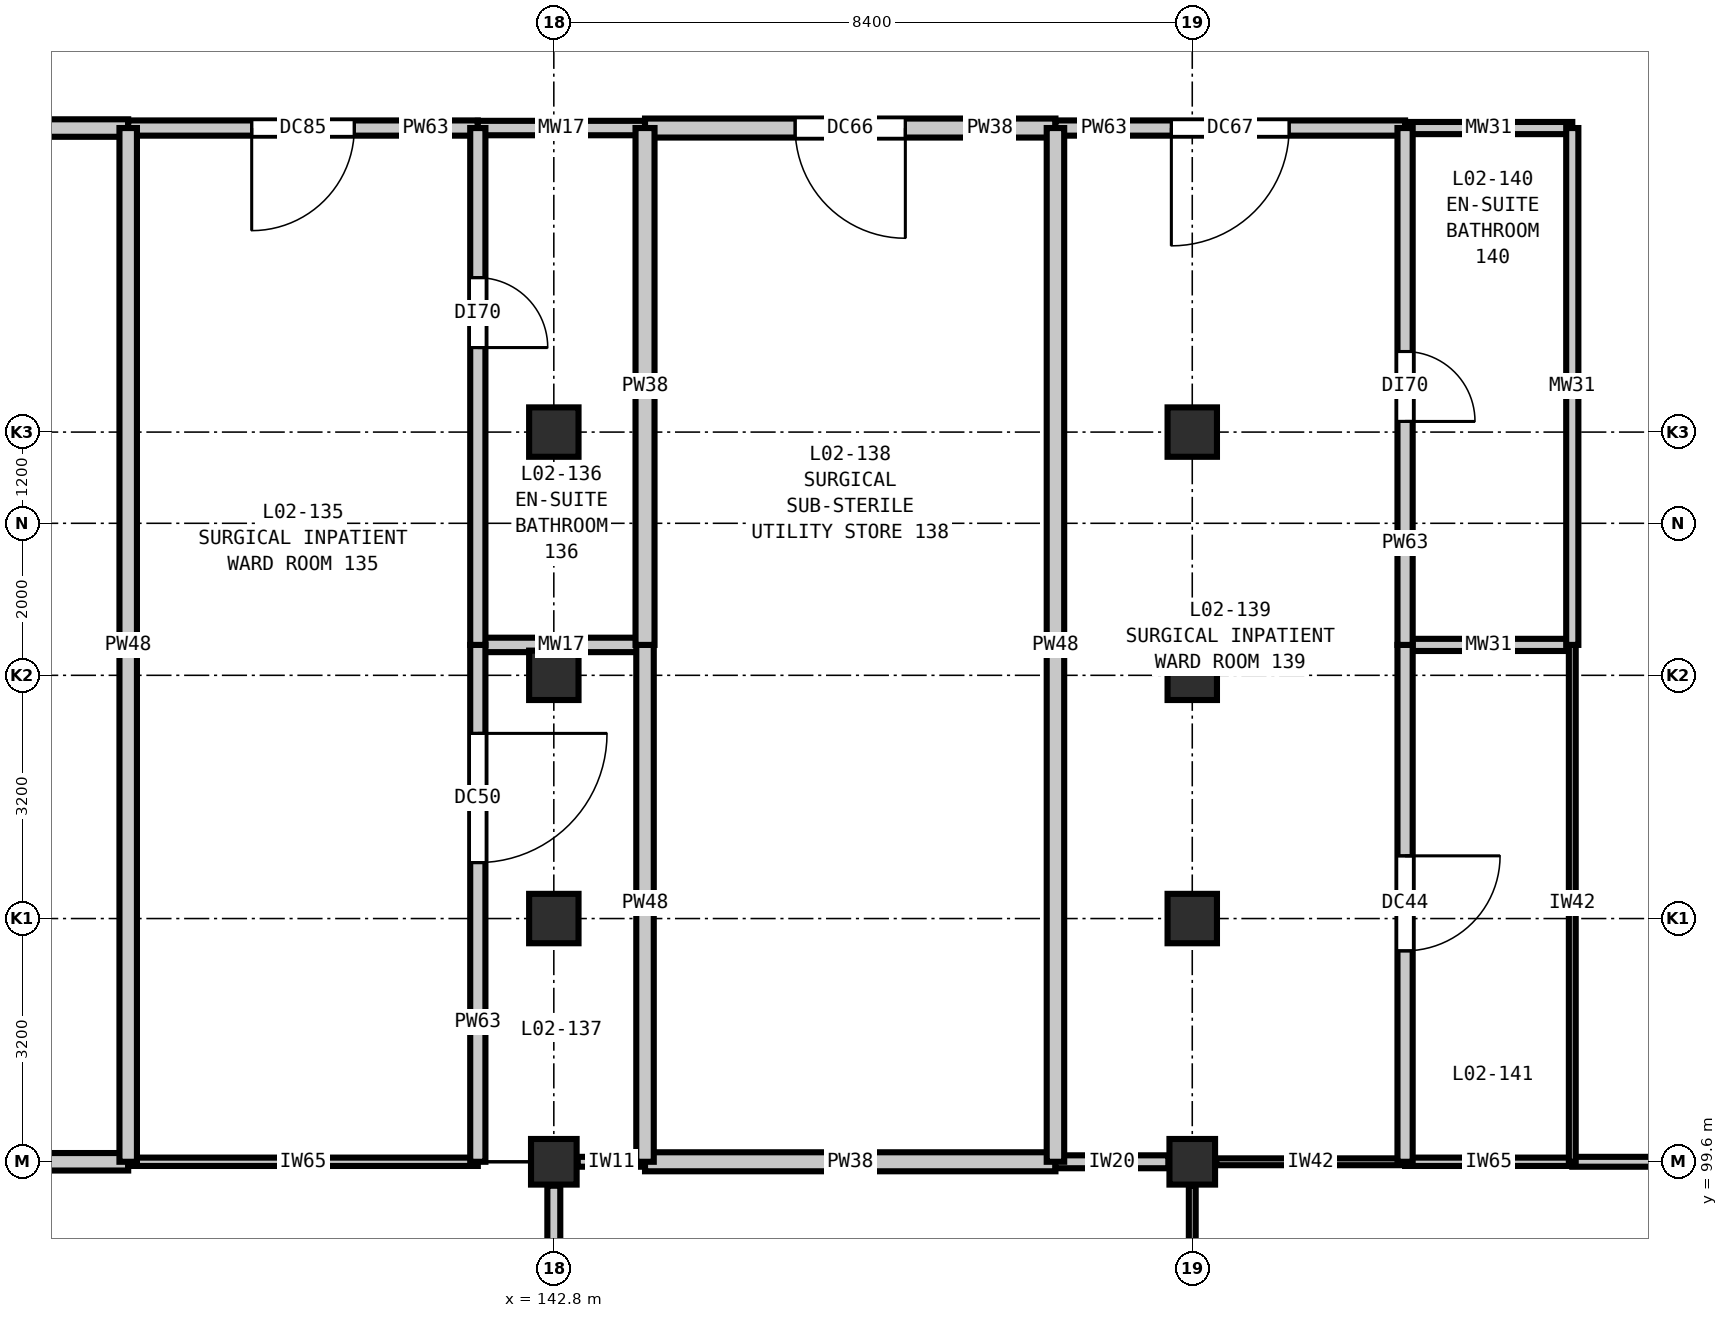
"""IFC4 building model, lengths in metres.
Left out: names, types, materials, properties, quantities, classifications, styles, units other than length and angle.
Written with IfcOpenShell. Run it as: python <this file> out.ifc"""

import sys

from ifc_helpers import new_model, si_unit, direction, frame, frame_2d, origin, origin_2d, place, context, subcontext, project, spatial, rectangle, extrude, element, fill, save


model = new_model("IFC4")
c1 = context("Model", 3, precision=1e-05, world=origin(), true_north=direction((0.0, 1.0)))
c2 = subcontext(c1, "Body", "Model", "MODEL_VIEW")
j1 = project(units=[si_unit("LENGTHUNIT", "METRE"), si_unit("PLANEANGLEUNIT", "RADIAN")], contexts=[c1])
p1 = place(None, origin())
s1 = spatial("IfcSite", under=j1, at=p1, CompositionType="ELEMENT")
p2 = place(p1, origin())
s2 = spatial("IfcBuilding", under=s1, at=p2, CompositionType="ELEMENT")
p3 = place(p2, frame((0.0, 0.0, 10.8)))
s3 = spatial("IfcBuildingStorey", under=s2, at=p3, CompositionType="ELEMENT", Elevation=10.8)
p4 = place(p3, frame((142.8, 99.6, 0.0), z_axis=(0.0, 0.0, 1.0), x_axis=(1.0, 0.0, 0.0)))
e1 = element("IfcColumn", 1, at=p4, inside=s3, PredefinedType="COLUMN", context=c2, shape_type="SweptSolid", body=[
    extrude(rectangle(XDim=0.6, YDim=0.6, at=origin_2d()), origin(), (0.0, 0.0, 1.0), 5.4),
])
for number, where, z_axis, x_axis in (
    (2, (142.8, 102.8, 0.0), (0.0, 0.0, 1.0), (1.0, 0.0, 0.0)),
    (3, (142.8, 106.0, 0.0), (0.0, 0.0, 1.0), (1.0, 0.0, 0.0)),
    (4, (142.8, 109.2, 0.0), (0.0, 0.0, 1.0), (1.0, 0.0, 0.0)),
):
    element("IfcColumn", number, at=place(p3, frame(where, z_axis=z_axis, x_axis=x_axis)), inside=s3, PredefinedType="COLUMN", context=c2, shape_type="SweptSolid", body=[
        extrude(rectangle(XDim=0.65, YDim=0.65, at=origin_2d()), origin(), (0.0, 0.0, 1.0), 5.4),
    ])
p5 = place(p3, frame((151.2, 99.6, 0.0), z_axis=(0.0, 0.0, 1.0), x_axis=(1.0, 0.0, 0.0)))
e5 = element("IfcColumn", 5, at=p5, inside=s3, PredefinedType="COLUMN", context=c2, shape_type="SweptSolid", body=[
    extrude(rectangle(XDim=0.6, YDim=0.6, at=origin_2d()), origin(), (0.0, 0.0, 1.0), 5.4),
])
for number, where, z_axis, x_axis in (
    (6, (151.2, 102.8, 0.0), (0.0, 0.0, 1.0), (1.0, 0.0, 0.0)),
    (7, (151.2, 106.0, 0.0), (0.0, 0.0, 1.0), (1.0, 0.0, 0.0)),
    (8, (151.2, 109.2, 0.0), (0.0, 0.0, 1.0), (1.0, 0.0, 0.0)),
):
    element("IfcColumn", number, at=place(p3, frame(where, z_axis=z_axis, x_axis=x_axis)), inside=s3, PredefinedType="COLUMN", context=c2, shape_type="SweptSolid", body=[
        extrude(rectangle(XDim=0.65, YDim=0.65, at=origin_2d()), origin(), (0.0, 0.0, 1.0), 5.4),
    ])
p6 = place(p3, frame((135.8, 99.6, 0.0), z_axis=(0.0, 0.0, 1.0), x_axis=(1.0, 0.0, 0.0)))
e9 = element("IfcWall", 9, at=p6, inside=s3, PredefinedType="PARTITIONING", context=c2, shape_type="SweptSolid", body=[
    extrude(rectangle(XDim=1.4, YDim=0.23, at=frame_2d((0.7, 0.0))), origin(), (0.0, 0.0, 1.0), 4.735),
])
p7 = place(p3, frame((137.2, 99.6, 0.0), z_axis=(0.0, 0.0, 1.0), x_axis=(1.0, 0.0, 0.0)))
e10 = element("IfcWall", 10, at=p7, inside=s3, PredefinedType="PARTITIONING", context=c2, shape_type="SweptSolid", body=[
    extrude(rectangle(XDim=4.6, YDim=0.11, at=frame_2d((2.3, 0.0))), origin(), (0.0, 0.0, 1.0), 4.735),
])
p8 = place(p3, frame((143.115, 99.6, 0.0), z_axis=(0.0, 0.0, 1.0), x_axis=(1.0, 0.0, 0.0)))
e11 = element("IfcWall", 11, at=p8, inside=s3, PredefinedType="PARTITIONING", context=c2, shape_type="SweptSolid", body=[
    extrude(rectangle(XDim=0.885, YDim=0.13, at=frame_2d((0.442, 0.0))), origin(), (0.0, 0.0, 1.0), 4.735),
])
p9 = place(p3, frame((144.0, 99.6, 0.0), z_axis=(0.0, 0.0, 1.0), x_axis=(1.0, 0.0, 0.0)))
e12 = element("IfcWall", 12, at=p9, inside=s3, PredefinedType="PARTITIONING", context=c2, shape_type="SweptSolid", body=[
    extrude(rectangle(XDim=5.4, YDim=0.25, at=frame_2d((2.7, 0.0))), origin(), (0.0, 0.0, 1.0), 4.735),
])
p10 = place(p3, frame((149.4, 99.6, 0.0), z_axis=(0.0, 0.0, 1.0), x_axis=(1.0, 0.0, 0.0)))
e13 = element("IfcWall", 13, at=p10, inside=s3, PredefinedType="PARTITIONING", context=c2, shape_type="SweptSolid", body=[
    extrude(rectangle(XDim=1.485, YDim=0.17, at=frame_2d((0.743, 0.0))), origin(), (0.0, 0.0, 1.0), 4.735),
])
p11 = place(p3, frame((151.515, 99.6, 0.0), z_axis=(0.0, 0.0, 1.0), x_axis=(1.0, 0.0, 0.0)))
e14 = element("IfcWall", 14, at=p11, inside=s3, PredefinedType="PARTITIONING", context=c2, shape_type="SweptSolid", body=[
    extrude(rectangle(XDim=2.485, YDim=0.09, at=frame_2d((1.243, 0.0))), origin(), (0.0, 0.0, 1.0), 4.735),
])
p12 = place(p3, frame((154.0, 99.6, 0.0), z_axis=(0.0, 0.0, 1.0), x_axis=(1.0, 0.0, 0.0)))
e15 = element("IfcWall", 15, at=p12, inside=s3, PredefinedType="PARTITIONING", context=c2, shape_type="SweptSolid", body=[
    extrude(rectangle(XDim=2.2, YDim=0.11, at=frame_2d((1.1, 0.0))), origin(), (0.0, 0.0, 1.0), 4.735),
])
p13 = place(p3, frame((156.2, 99.6, 0.0), z_axis=(0.0, 0.0, 1.0), x_axis=(1.0, 0.0, 0.0)))
e16 = element("IfcWall", 16, at=p13, inside=s3, PredefinedType="PARTITIONING", context=c2, shape_type="SweptSolid", body=[
    extrude(rectangle(XDim=3.06, YDim=0.13, at=frame_2d((1.53, 0.0))), origin(), (0.0, 0.0, 1.0), 4.735),
])
p14 = place(p3, frame((141.8, 106.4, 0.0), z_axis=(0.0, 0.0, 1.0), x_axis=(1.0, 0.0, 0.0)))
e17 = element("IfcWall", 17, at=p14, inside=s3, PredefinedType="PLUMBINGWALL", context=c2, shape_type="SweptSolid", body=[
    extrude(rectangle(XDim=2.2, YDim=0.19, at=frame_2d((1.1, 0.0))), origin(), (0.0, 0.0, 1.0), 5.07),
])
p15 = place(p3, frame((154.0, 106.4, 0.0), z_axis=(0.0, 0.0, 1.0), x_axis=(1.0, 0.0, 0.0)))
e18 = element("IfcWall", 18, at=p15, inside=s3, PredefinedType="PLUMBINGWALL", context=c2, shape_type="SweptSolid", body=[
    extrude(rectangle(XDim=2.2, YDim=0.16, at=frame_2d((1.1, 0.0))), origin(), (0.0, 0.0, 1.0), 5.07),
])
p16 = place(p3, frame((131.8, 113.2, 0.0), z_axis=(0.0, 0.0, 1.0), x_axis=(1.0, 0.0, 0.0)))
e19 = element("IfcWall", 19, at=p16, inside=s3, PredefinedType="PARTITIONING", context=c2, shape_type="SweptSolid", body=[
    extrude(rectangle(XDim=5.4, YDim=0.23, at=frame_2d((2.7, 0.0))), origin(), (0.0, 0.0, 1.0), 5.07),
])
p17 = place(p16, frame((2.05, 0.0, 0.0)))
e20 = element("IfcOpeningElement", 20, at=p17, cuts=e19, PredefinedType="OPENING", context=c2, shape_type="SweptSolid", body=[
    extrude(rectangle(XDim=1.3, YDim=2.2, at=frame_2d((0.65, 1.1))), frame((0.0, 0.125, 0.0), z_axis=(0.0, -1.0, 0.0), x_axis=(1.0, 0.0, 0.0)), (0.0, 0.0, 1.0), 0.25),
])
p18 = place(p3, frame((137.2, 113.2, 0.0), z_axis=(0.0, 0.0, 1.0), x_axis=(1.0, 0.0, 0.0)))
e21 = element("IfcWall", 21, at=p18, inside=s3, PredefinedType="PARTITIONING", context=c2, shape_type="SweptSolid", body=[
    extrude(rectangle(XDim=4.6, YDim=0.2, at=frame_2d((2.3, 0.0))), origin(), (0.0, 0.0, 1.0), 5.07),
])
p19 = place(p18, frame((1.625, 0.0, 0.0)))
e22 = element("IfcOpeningElement", 22, at=p19, cuts=e21, PredefinedType="OPENING", context=c2, shape_type="SweptSolid", body=[
    extrude(rectangle(XDim=1.35, YDim=2.2, at=frame_2d((0.675, 1.1))), frame((0.0, 0.11, 0.0), z_axis=(0.0, -1.0, 0.0), x_axis=(1.0, 0.0, 0.0)), (0.0, 0.0, 1.0), 0.22),
])
p20 = place(p3, frame((141.8, 113.2, 0.0), z_axis=(0.0, 0.0, 1.0), x_axis=(1.0, 0.0, 0.0)))
e23 = element("IfcWall", 23, at=p20, inside=s3, PredefinedType="PLUMBINGWALL", context=c2, shape_type="SweptSolid", body=[
    extrude(rectangle(XDim=2.2, YDim=0.19, at=frame_2d((1.1, 0.0))), origin(), (0.0, 0.0, 1.0), 5.07),
])
p21 = place(p3, frame((144.0, 113.2, 0.0), z_axis=(0.0, 0.0, 1.0), x_axis=(1.0, 0.0, 0.0)))
e24 = element("IfcWall", 24, at=p21, inside=s3, PredefinedType="PARTITIONING", context=c2, shape_type="SweptSolid", body=[
    extrude(rectangle(XDim=5.4, YDim=0.25, at=frame_2d((2.7, 0.0))), origin(), (0.0, 0.0, 1.0), 5.07),
])
p22 = place(p21, frame((1.975, 0.0, 0.0)))
e25 = element("IfcOpeningElement", 25, at=p22, cuts=e24, PredefinedType="OPENING", context=c2, shape_type="SweptSolid", body=[
    extrude(rectangle(XDim=1.45, YDim=2.25, at=frame_2d((0.725, 1.125))), frame((0.0, 0.135, 0.0), z_axis=(0.0, -1.0, 0.0), x_axis=(1.0, 0.0, 0.0)), (0.0, 0.0, 1.0), 0.27),
])
p23 = place(p3, frame((149.4, 113.2, 0.0), z_axis=(0.0, 0.0, 1.0), x_axis=(1.0, 0.0, 0.0)))
e26 = element("IfcWall", 26, at=p23, inside=s3, PredefinedType="PARTITIONING", context=c2, shape_type="SweptSolid", body=[
    extrude(rectangle(XDim=4.6, YDim=0.2, at=frame_2d((2.3, 0.0))), origin(), (0.0, 0.0, 1.0), 5.07),
])
p24 = place(p23, frame((1.525, 0.0, 0.0)))
e27 = element("IfcOpeningElement", 27, at=p24, cuts=e26, PredefinedType="OPENING", context=c2, shape_type="SweptSolid", body=[
    extrude(rectangle(XDim=1.55, YDim=2.25, at=frame_2d((0.775, 1.125))), frame((0.0, 0.11, 0.0), z_axis=(0.0, -1.0, 0.0), x_axis=(1.0, 0.0, 0.0)), (0.0, 0.0, 1.0), 0.22),
])
p25 = place(p3, frame((154.0, 113.2, 0.0), z_axis=(0.0, 0.0, 1.0), x_axis=(1.0, 0.0, 0.0)))
e28 = element("IfcWall", 28, at=p25, inside=s3, PredefinedType="PLUMBINGWALL", context=c2, shape_type="SweptSolid", body=[
    extrude(rectangle(XDim=2.2, YDim=0.16, at=frame_2d((1.1, 0.0))), origin(), (0.0, 0.0, 1.0), 5.07),
])
p26 = place(p3, frame((137.2, 99.6, 0.0), z_axis=(0.0, 0.0, 1.0), x_axis=(0.0, 1.0, 0.0)))
e29 = element("IfcWall", 29, at=p26, inside=s3, PredefinedType="PARTITIONING", context=c2, shape_type="SweptSolid", body=[
    extrude(rectangle(XDim=13.6, YDim=0.23, at=frame_2d((6.8, 0.0))), origin(), (0.0, 0.0, 1.0), 5.07),
])
p27 = place(p3, frame((141.8, 99.6, 0.0), z_axis=(0.0, 0.0, 1.0), x_axis=(0.0, 1.0, 0.0)))
e30 = element("IfcWall", 30, at=p27, inside=s3, PredefinedType="PARTITIONING", context=c2, shape_type="SweptSolid", body=[
    extrude(rectangle(XDim=6.8, YDim=0.2, at=frame_2d((3.4, 0.0))), origin(), (0.0, 0.0, 1.0), 5.07),
])
p28 = place(p27, frame((3.936, 0.0, 0.0)))
e31 = element("IfcOpeningElement", 31, at=p28, cuts=e30, PredefinedType="OPENING", context=c2, shape_type="SweptSolid", body=[
    extrude(rectangle(XDim=1.7, YDim=2.3, at=frame_2d((0.85, 1.15))), frame((0.0, 0.11, 0.0), z_axis=(0.0, -1.0, 0.0), x_axis=(1.0, 0.0, 0.0)), (0.0, 0.0, 1.0), 0.22),
])
p29 = place(p3, frame((141.8, 106.4, 0.0), z_axis=(0.0, 0.0, 1.0), x_axis=(0.0, 1.0, 0.0)))
e32 = element("IfcWall", 32, at=p29, inside=s3, PredefinedType="PARTITIONING", context=c2, shape_type="SweptSolid", body=[
    extrude(rectangle(XDim=6.8, YDim=0.2, at=frame_2d((3.4, 0.0))), origin(), (0.0, 0.0, 1.0), 5.07),
])
p30 = place(p29, frame((3.912, 0.0, 0.0)))
e33 = element("IfcOpeningElement", 33, at=p30, cuts=e32, PredefinedType="OPENING", context=c2, shape_type="SweptSolid", body=[
    extrude(rectangle(XDim=0.92, YDim=2.1, at=frame_2d((0.46, 1.05))), frame((0.0, 0.11, 0.0), z_axis=(0.0, -1.0, 0.0), x_axis=(1.0, 0.0, 0.0)), (0.0, 0.0, 1.0), 0.22),
])
p31 = place(p3, frame((142.8, 91.515, 0.0), z_axis=(0.0, 0.0, 1.0), x_axis=(0.0, 1.0, 0.0)))
e34 = element("IfcWall", 34, at=p31, inside=s3, PredefinedType="PARTITIONING", context=c2, shape_type="SweptSolid", body=[
    extrude(rectangle(XDim=7.77, YDim=0.17, at=frame_2d((3.885, 0.0))), origin(), (0.0, 0.0, 1.0), 4.735),
])
p32 = place(p3, frame((144.0, 99.6, 0.0), z_axis=(0.0, 0.0, 1.0), x_axis=(0.0, 1.0, 0.0)))
e35 = element("IfcWall", 35, at=p32, inside=s3, PredefinedType="PARTITIONING", context=c2, shape_type="SweptSolid", body=[
    extrude(rectangle(XDim=6.8, YDim=0.23, at=frame_2d((3.4, 0.0))), origin(), (0.0, 0.0, 1.0), 5.07),
])
p33 = place(p3, frame((144.0, 106.4, 0.0), z_axis=(0.0, 0.0, 1.0), x_axis=(0.0, 1.0, 0.0)))
e36 = element("IfcWall", 36, at=p33, inside=s3, PredefinedType="PARTITIONING", context=c2, shape_type="SweptSolid", body=[
    extrude(rectangle(XDim=6.8, YDim=0.25, at=frame_2d((3.4, 0.0))), origin(), (0.0, 0.0, 1.0), 5.07),
])
p34 = place(p3, frame((149.4, 99.6, 0.0), z_axis=(0.0, 0.0, 1.0), x_axis=(0.0, 1.0, 0.0)))
e37 = element("IfcWall", 37, at=p34, inside=s3, PredefinedType="PARTITIONING", context=c2, shape_type="SweptSolid", body=[
    extrude(rectangle(XDim=13.6, YDim=0.23, at=frame_2d((6.8, 0.0))), origin(), (0.0, 0.0, 1.0), 5.07),
])
p35 = place(p3, frame((151.2, 95.0, 0.0), z_axis=(0.0, 0.0, 1.0), x_axis=(0.0, 1.0, 0.0)))
e38 = element("IfcWall", 38, at=p35, inside=s3, PredefinedType="PARTITIONING", context=c2, shape_type="SweptSolid", body=[
    extrude(rectangle(XDim=4.285, YDim=0.09, at=frame_2d((2.143, 0.0))), origin(), (0.0, 0.0, 1.0), 4.735),
])
p36 = place(p3, frame((154.0, 99.6, 0.0), z_axis=(0.0, 0.0, 1.0), x_axis=(0.0, 1.0, 0.0)))
e39 = element("IfcWall", 39, at=p36, inside=s3, PredefinedType="PARTITIONING", context=c2, shape_type="SweptSolid", body=[
    extrude(rectangle(XDim=6.8, YDim=0.2, at=frame_2d((3.4, 0.0))), origin(), (0.0, 0.0, 1.0), 5.07),
])
p37 = place(p36, frame((2.775, 0.0, 0.0)))
e40 = element("IfcOpeningElement", 40, at=p37, cuts=e39, PredefinedType="OPENING", context=c2, shape_type="SweptSolid", body=[
    extrude(rectangle(XDim=1.25, YDim=2.15, at=frame_2d((0.625, 1.075))), frame((0.0, 0.11, 0.0), z_axis=(0.0, -1.0, 0.0), x_axis=(1.0, 0.0, 0.0)), (0.0, 0.0, 1.0), 0.22),
])
p38 = place(p3, frame((154.0, 106.4, 0.0), z_axis=(0.0, 0.0, 1.0), x_axis=(0.0, 1.0, 0.0)))
e41 = element("IfcWall", 41, at=p38, inside=s3, PredefinedType="PARTITIONING", context=c2, shape_type="SweptSolid", body=[
    extrude(rectangle(XDim=6.8, YDim=0.2, at=frame_2d((3.4, 0.0))), origin(), (0.0, 0.0, 1.0), 5.07),
])
p39 = place(p38, frame((2.94, 0.0, 0.0)))
e42 = element("IfcOpeningElement", 42, at=p39, cuts=e41, PredefinedType="OPENING", context=c2, shape_type="SweptSolid", body=[
    extrude(rectangle(XDim=0.92, YDim=2.1, at=frame_2d((0.46, 1.05))), frame((0.0, 0.11, 0.0), z_axis=(0.0, -1.0, 0.0), x_axis=(1.0, 0.0, 0.0)), (0.0, 0.0, 1.0), 0.22),
])
p40 = place(p3, frame((156.2, 99.6, 0.0), z_axis=(0.0, 0.0, 1.0), x_axis=(0.0, 1.0, 0.0)))
e43 = element("IfcWall", 43, at=p40, inside=s3, PredefinedType="PARTITIONING", context=c2, shape_type="SweptSolid", body=[
    extrude(rectangle(XDim=6.8, YDim=0.09, at=frame_2d((3.4, 0.0))), origin(), (0.0, 0.0, 1.0), 5.07),
])
p41 = place(p3, frame((156.2, 106.4, 0.0), z_axis=(0.0, 0.0, 1.0), x_axis=(0.0, 1.0, 0.0)))
e44 = element("IfcWall", 44, at=p41, inside=s3, PredefinedType="PLUMBINGWALL", context=c2, shape_type="SweptSolid", body=[
    extrude(rectangle(XDim=6.8, YDim=0.16, at=frame_2d((3.4, 0.0))), origin(), (0.0, 0.0, 1.0), 5.07),
])
p42 = place(p19, frame((1.35, 0.0, 0.0), z_axis=(0.0, 0.0, 1.0), x_axis=(-1.0, 0.0, 0.0)))
e45 = element("IfcDoor", 45, at=p42, inside=s3, OperationType="SINGLE_SWING_RIGHT", PredefinedType="DOOR", context=c2, shape_type="SweptSolid", body=[
    extrude(rectangle(XDim=1.35, YDim=2.2, at=frame_2d((0.675, 1.1))), frame((0.0, 0.025, 0.0), z_axis=(0.0, -1.0, 0.0), x_axis=(1.0, 0.0, 0.0)), (0.0, 0.0, 1.0), 0.05),
])
fill(e22, e45)
p43 = place(p22, frame((1.45, 0.0, 0.0), z_axis=(0.0, 0.0, 1.0), x_axis=(-1.0, 0.0, 0.0)))
e46 = element("IfcDoor", 46, at=p43, inside=s3, OperationType="SINGLE_SWING_LEFT", PredefinedType="DOOR", context=c2, shape_type="SweptSolid", body=[
    extrude(rectangle(XDim=1.45, YDim=2.25, at=frame_2d((0.725, 1.125))), frame((0.0, 0.025, 0.0), z_axis=(0.0, -1.0, 0.0), x_axis=(1.0, 0.0, 0.0)), (0.0, 0.0, 1.0), 0.05),
])
fill(e25, e46)
p44 = place(p24, frame((1.55, 0.0, 0.0), z_axis=(0.0, 0.0, 1.0), x_axis=(-1.0, 0.0, 0.0)))
e47 = element("IfcDoor", 47, at=p44, inside=s3, OperationType="SINGLE_SWING_RIGHT", PredefinedType="DOOR", context=c2, shape_type="SweptSolid", body=[
    extrude(rectangle(XDim=1.55, YDim=2.25, at=frame_2d((0.775, 1.125))), frame((0.0, 0.025, 0.0), z_axis=(0.0, -1.0, 0.0), x_axis=(1.0, 0.0, 0.0)), (0.0, 0.0, 1.0), 0.05),
])
fill(e27, e47)
p45 = place(p28, frame((1.7, 0.0, 0.0), z_axis=(0.0, 0.0, 1.0), x_axis=(-1.0, 0.0, 0.0)))
e48 = element("IfcDoor", 48, at=p45, inside=s3, OperationType="SINGLE_SWING_LEFT", PredefinedType="DOOR", context=c2, shape_type="SweptSolid", body=[
    extrude(rectangle(XDim=1.7, YDim=2.3, at=frame_2d((0.85, 1.15))), frame((0.0, 0.025, 0.0), z_axis=(0.0, -1.0, 0.0), x_axis=(1.0, 0.0, 0.0)), (0.0, 0.0, 1.0), 0.05),
])
fill(e31, e48)
p46 = place(p30, frame((0.92, 0.0, 0.0), z_axis=(0.0, 0.0, 1.0), x_axis=(-1.0, 0.0, 0.0)))
e49 = element("IfcDoor", 49, at=p46, inside=s3, OperationType="SINGLE_SWING_RIGHT", PredefinedType="DOOR", context=c2, shape_type="SweptSolid", body=[
    extrude(rectangle(XDim=0.92, YDim=2.1, at=frame_2d((0.46, 1.05))), frame((0.0, 0.025, 0.0), z_axis=(0.0, -1.0, 0.0), x_axis=(1.0, 0.0, 0.0)), (0.0, 0.0, 1.0), 0.05),
])
fill(e33, e49)
p47 = place(p37, frame((1.25, 0.0, 0.0), z_axis=(0.0, 0.0, 1.0), x_axis=(-1.0, 0.0, 0.0)))
e50 = element("IfcDoor", 50, at=p47, inside=s3, OperationType="SINGLE_SWING_LEFT", PredefinedType="DOOR", context=c2, shape_type="SweptSolid", body=[
    extrude(rectangle(XDim=1.25, YDim=2.15, at=frame_2d((0.625, 1.075))), frame((0.0, 0.025, 0.0), z_axis=(0.0, -1.0, 0.0), x_axis=(1.0, 0.0, 0.0)), (0.0, 0.0, 1.0), 0.05),
])
fill(e40, e50)
p48 = place(p39, frame((0.92, 0.0, 0.0), z_axis=(0.0, 0.0, 1.0), x_axis=(-1.0, 0.0, 0.0)))
e51 = element("IfcDoor", 51, at=p48, inside=s3, OperationType="SINGLE_SWING_RIGHT", PredefinedType="DOOR", context=c2, shape_type="SweptSolid", body=[
    extrude(rectangle(XDim=0.92, YDim=2.1, at=frame_2d((0.46, 1.05))), frame((0.0, 0.025, 0.0), z_axis=(0.0, -1.0, 0.0), x_axis=(1.0, 0.0, 0.0)), (0.0, 0.0, 1.0), 0.05),
])
fill(e42, e51)
save(model, sys.argv[1])
